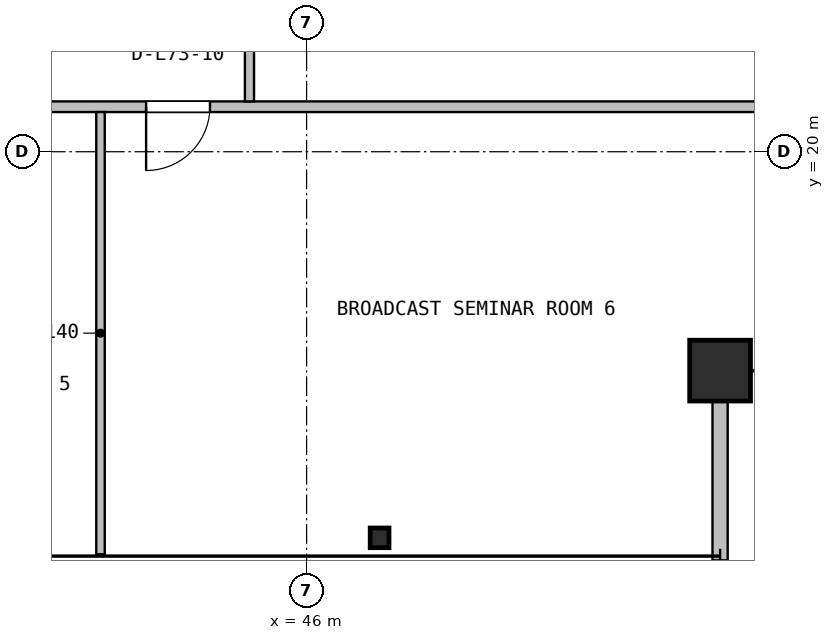
"""IFC4 building model, lengths in metres.
Left out: names, types, materials, properties, quantities, classifications, styles, units other than length and angle.
Written with IfcOpenShell. Run it as: python <this file> out.ifc"""

import sys

from ifc_helpers import new_model, si_unit, direction, frame, frame_2d, origin, origin_2d, place, context, subcontext, project, spatial, rectangle, hollow_rectangle, i_section, extrude, source, transform, mapped, element, fill, save


model = new_model("IFC4")
c1 = context("Model", 3, precision=1e-05, world=origin(), true_north=direction((0.0, 1.0)))
c2 = subcontext(c1, "Body", "Model", "MODEL_VIEW")
j1 = project(units=[si_unit("LENGTHUNIT", "METRE"), si_unit("PLANEANGLEUNIT", "RADIAN")], contexts=[c1])
p1 = place(None, origin())
s1 = spatial("IfcSite", under=j1, at=p1, CompositionType="ELEMENT")
p2 = place(p1, origin())
s2 = spatial("IfcBuilding", under=s1, at=p2, CompositionType="ELEMENT")
p3 = place(p2, frame((0.0, 0.0, 292.6)))
s3 = spatial("IfcBuildingStorey", under=s2, at=p3, CompositionType="ELEMENT", Elevation=292.6)
m1 = source(origin(), c2, "Body", "SweptSolid", [
    extrude(hollow_rectangle(XDim=1.0, YDim=1.0, WallThickness=0.04, at=origin_2d()), origin(), (0.0, 0.0, 1.0), 3.8),
])
p4 = place(p3, frame((52.8, 16.4, 0.0), z_axis=(0.0, 0.0, 1.0), x_axis=(1.0, 0.0, 0.0)))
e1 = element("IfcColumn", 1, at=p4, inside=s3, PredefinedType="COLUMN", context=c2, shape_type="MappedRepresentation", body=[
    mapped(m1, transform((0.0, 0.0, 0.0), x_axis=(1.0, 0.0, 0.0), y_axis=(0.0, 1.0, 0.0), z_axis=(0.0, 0.0, 1.0), scale=1.0)),
])
m2 = source(origin(), c2, "Body", "SweptSolid", [
    extrude(i_section(OverallWidth=0.309, OverallDepth=0.323, WebThickness=0.014, FlangeThickness=0.023, FilletRadius=0.015, at=origin_2d()), origin(), (0.0, 0.0, 1.0), 3.8),
])
p5 = place(p3, frame((47.2, 13.65, 0.0), z_axis=(0.0, 0.0, 1.0), x_axis=(1.0, 0.0, 0.0)))
e2 = element("IfcColumn", 2, at=p5, inside=s3, PredefinedType="COLUMN", context=c2, shape_type="MappedRepresentation", body=[
    mapped(m2, transform((0.0, 0.0, 0.0), x_axis=(1.0, 0.0, 0.0), y_axis=(0.0, 1.0, 0.0), z_axis=(0.0, 0.0, 1.0), scale=1.0)),
])
p6 = place(p3, frame((52.8, 13.28, 0.0), z_axis=(0.0, 0.0, 1.0), x_axis=(0.0, 1.0, 0.0)))
e3 = element("IfcWall", 3, at=p6, inside=s3, PredefinedType="SOLIDWALL", context=c2, shape_type="SweptSolid", body=[
    extrude(rectangle(XDim=3.2, YDim=0.25, at=frame_2d((1.6, 0.0))), origin(), (0.0, 0.0, 1.0), 3.171),
])
p7 = place(p3, frame((12.18, 20.74, 0.0), z_axis=(0.0, 0.0, 1.0), x_axis=(1.0, 0.0, 0.0)))
e4 = element("IfcWall", 4, at=p7, inside=s3, PredefinedType="PARTITIONING", context=c2, shape_type="SweptSolid", body=[
    extrude(rectangle(XDim=43.64, YDim=0.175, at=frame_2d((21.82, 0.0))), origin(), (0.0, 0.0, 1.0), 2.981),
])
p8 = place(p7, frame((12.09, 0.0, 0.0)))
e5 = element("IfcOpeningElement", 5, at=p8, cuts=e4, PredefinedType="OPENING", context=c2, shape_type="SweptSolid", body=[
    extrude(rectangle(XDim=1.05, YDim=2.1, at=frame_2d((0.525, 1.05))), frame((0.0, 0.098, 0.0), z_axis=(0.0, -1.0, 0.0), x_axis=(1.0, 0.0, 0.0)), (0.0, 0.0, 1.0), 0.195),
])
p9 = place(p7, frame((15.205, 0.0, 0.0)))
e6 = element("IfcOpeningElement", 6, at=p9, cuts=e4, PredefinedType="OPENING", context=c2, shape_type="SweptSolid", body=[
    extrude(rectangle(XDim=1.4, YDim=2.12, at=frame_2d((0.7, 1.06))), frame((0.0, 0.098, 0.0), z_axis=(0.0, -1.0, 0.0), x_axis=(1.0, 0.0, 0.0)), (0.0, 0.0, 1.0), 0.195),
])
p10 = place(p7, frame((20.215, 0.0, 0.0)))
e7 = element("IfcOpeningElement", 7, at=p10, cuts=e4, PredefinedType="OPENING", context=c2, shape_type="SweptSolid", body=[
    extrude(rectangle(XDim=0.88, YDim=2.06, at=frame_2d((0.44, 1.03))), frame((0.0, 0.098, 0.0), z_axis=(0.0, -1.0, 0.0), x_axis=(1.0, 0.0, 0.0)), (0.0, 0.0, 1.0), 0.195),
])
p11 = place(p7, frame((24.33, 0.0, 0.0)))
e8 = element("IfcOpeningElement", 8, at=p11, cuts=e4, PredefinedType="OPENING", context=c2, shape_type="SweptSolid", body=[
    extrude(rectangle(XDim=0.92, YDim=2.08, at=frame_2d((0.46, 1.04))), frame((0.0, 0.098, 0.0), z_axis=(0.0, -1.0, 0.0), x_axis=(1.0, 0.0, 0.0)), (0.0, 0.0, 1.0), 0.195),
])
p12 = place(p7, frame((27.91, 0.0, 0.0)))
e9 = element("IfcOpeningElement", 9, at=p12, cuts=e4, PredefinedType="OPENING", context=c2, shape_type="SweptSolid", body=[
    extrude(rectangle(XDim=1.0, YDim=2.1, at=frame_2d((0.5, 1.05))), frame((0.0, 0.098, 0.0), z_axis=(0.0, -1.0, 0.0), x_axis=(1.0, 0.0, 0.0)), (0.0, 0.0, 1.0), 0.195),
])
p13 = place(p7, frame((31.18, 0.0, 0.0)))
e10 = element("IfcOpeningElement", 10, at=p13, cuts=e4, PredefinedType="OPENING", context=c2, shape_type="SweptSolid", body=[
    extrude(rectangle(XDim=1.05, YDim=2.1, at=frame_2d((0.525, 1.05))), frame((0.0, 0.098, 0.0), z_axis=(0.0, -1.0, 0.0), x_axis=(1.0, 0.0, 0.0)), (0.0, 0.0, 1.0), 0.195),
])
p14 = place(p3, frame((42.61, 13.38, 0.0), z_axis=(0.0, 0.0, 1.0), x_axis=(0.0, 1.0, 0.0)))
e11 = element("IfcWall", 11, at=p14, inside=s3, PredefinedType="PARTITIONING", context=c2, shape_type="SweptSolid", body=[
    extrude(rectangle(XDim=7.272, YDim=0.14, at=frame_2d((3.636, 0.0))), origin(), (0.0, 0.0, 1.0), 3.171),
])
p15 = place(p3, frame((45.06, 20.827, 0.0), z_axis=(0.0, 0.0, 1.0), x_axis=(0.0, 1.0, 0.0)))
e12 = element("IfcWall", 12, at=p15, inside=s3, PredefinedType="PARTITIONING", context=c2, shape_type="SweptSolid", body=[
    extrude(rectangle(XDim=12.448, YDim=0.15, at=frame_2d((6.224, 0.0))), origin(), (0.0, 0.0, 1.0), 3.222),
])
p16 = place(p15, frame((2.068, 0.0, 0.0)))
e13 = element("IfcOpeningElement", 13, at=p16, cuts=e12, PredefinedType="OPENING", context=c2, shape_type="SweptSolid", body=[
    extrude(rectangle(XDim=0.88, YDim=2.06, at=frame_2d((0.44, 1.03))), frame((0.0, 0.085, 0.0), z_axis=(0.0, -1.0, 0.0), x_axis=(1.0, 0.0, 0.0)), (0.0, 0.0, 1.0), 0.17),
])
p17 = place(p15, frame((8.353, 0.0, 0.0)))
e14 = element("IfcOpeningElement", 14, at=p17, cuts=e12, PredefinedType="OPENING", context=c2, shape_type="SweptSolid", body=[
    extrude(rectangle(XDim=0.92, YDim=2.08, at=frame_2d((0.46, 1.04))), frame((0.0, 0.085, 0.0), z_axis=(0.0, -1.0, 0.0), x_axis=(1.0, 0.0, 0.0)), (0.0, 0.0, 1.0), 0.17),
])
m3 = source(origin(), c2, "Body", "SweptSolid", [
    extrude(rectangle(XDim=1.05, YDim=2.1, at=frame_2d((0.525, 1.05))), frame((0.0, 0.025, 0.0), z_axis=(0.0, -1.0, 0.0), x_axis=(1.0, 0.0, 0.0)), (0.0, 0.0, 1.0), 0.05),
])
p18 = place(p13, frame((1.05, 0.0, 0.0), z_axis=(0.0, 0.0, 1.0), x_axis=(-1.0, 0.0, 0.0)))
e15 = element("IfcDoor", 15, at=p18, inside=s3, OperationType="SINGLE_SWING_LEFT", PredefinedType="DOOR", context=c2, shape_type="MappedRepresentation", body=[
    mapped(m3, transform((0.0, 0.0, 0.0), x_axis=(1.0, 0.0, 0.0), y_axis=(0.0, 1.0, 0.0), z_axis=(0.0, 0.0, 1.0), scale=1.0)),
])
fill(e10, e15)
save(model, sys.argv[1])
